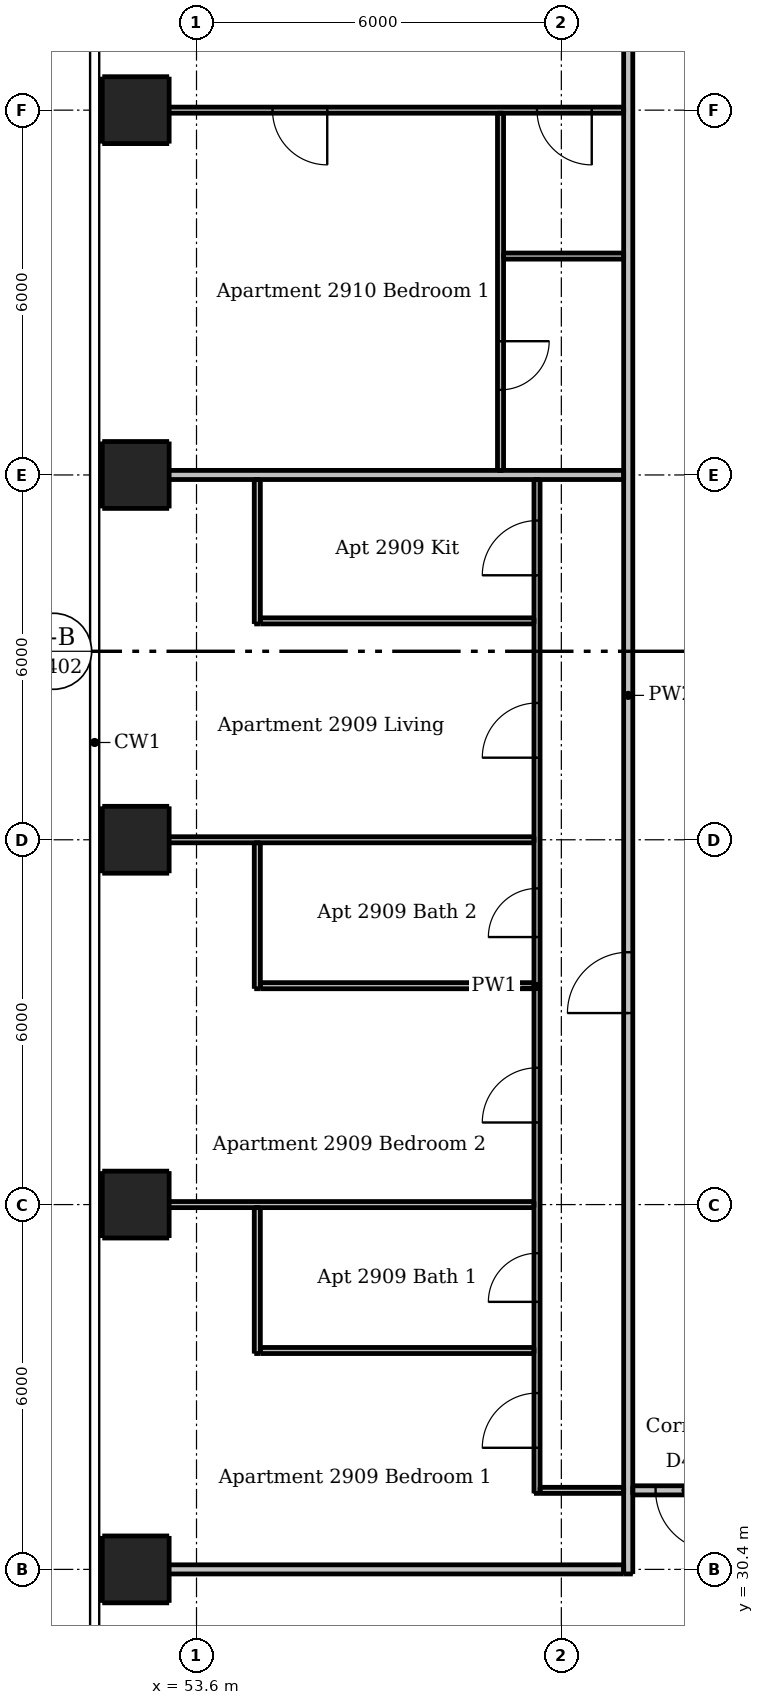
"""IFC4 building model, lengths in metres.
Left out: names, types, materials, properties, quantities, classifications, styles, units other than length and angle.
Written with IfcOpenShell. Run it as: python <this file> out.ifc"""

import sys

from ifc_helpers import new_model, si_unit, direction, frame, frame_2d, origin, origin_2d, place, context, subcontext, project, spatial, rectangle, extrude, element, fill, save


model = new_model("IFC4")
c1 = context("Model", 3, precision=1e-05, world=origin(), true_north=direction((0.0, 1.0)))
c2 = subcontext(c1, "Body", "Model", "MODEL_VIEW")
j1 = project(units=[si_unit("LENGTHUNIT", "METRE"), si_unit("PLANEANGLEUNIT", "RADIAN")], contexts=[c1])
p1 = place(None, origin())
s1 = spatial("IfcSite", under=j1, at=p1, CompositionType="ELEMENT")
p2 = place(p1, origin())
s2 = spatial("IfcBuilding", under=s1, at=p2, CompositionType="ELEMENT")
p3 = place(p2, frame((0.0, 0.0, 108.4)))
s3 = spatial("IfcBuildingStorey", under=s2, at=p3, CompositionType="ELEMENT", Elevation=108.4)
for number, where, z_axis, x_axis in (
    (1, (52.6, 30.4, 0.0), (0.0, 0.0, 1.0), (1.0, 0.0, 0.0)),
    (2, (52.6, 36.4, 0.0), (0.0, 0.0, 1.0), (1.0, 0.0, 0.0)),
    (3, (52.6, 42.4, 0.0), (0.0, 0.0, 1.0), (1.0, 0.0, 0.0)),
    (4, (52.6, 48.4, 0.0), (0.0, 0.0, 1.0), (1.0, 0.0, 0.0)),
    (5, (52.6, 54.4, 0.0), (0.0, 0.0, 1.0), (1.0, 0.0, 0.0)),
):
    element("IfcColumn", number, at=place(p3, frame(where, z_axis=z_axis, x_axis=x_axis)), inside=s3, PredefinedType="COLUMN", context=c2, shape_type="SweptSolid", body=[
        extrude(rectangle(XDim=1.1, YDim=1.1, at=origin_2d()), origin(), (0.0, 0.0, 1.0), 3.05),
    ])
for number, where, z_axis, x_axis in (
    (6, (54.6, 33.95, 0.0), (0.0, 0.0, 1.0), (0.0, 1.0, 0.0)),
    (7, (54.6, 39.95, 0.0), (0.0, 0.0, 1.0), (0.0, 1.0, 0.0)),
):
    element("IfcWall", number, at=place(p3, frame(where, z_axis=z_axis, x_axis=x_axis)), inside=s3, PredefinedType="PARTITIONING", context=c2, shape_type="SweptSolid", body=[
        extrude(rectangle(XDim=2.4, YDim=0.1, at=frame_2d((1.2, 0.0))), origin(), (0.0, 0.0, 1.0), 3.05),
    ])
p4 = place(p3, frame((54.6, 45.95, 0.0), z_axis=(0.0, 0.0, 1.0), x_axis=(0.0, 1.0, 0.0)))
e8 = element("IfcWall", 8, at=p4, inside=s3, PredefinedType="PARTITIONING", context=c2, shape_type="SweptSolid", body=[
    extrude(rectangle(XDim=2.375, YDim=0.1, at=frame_2d((1.188, 0.0))), origin(), (0.0, 0.0, 1.0), 3.05),
])
p5 = place(p3, frame((58.6, 54.35, 0.0), z_axis=(0.0, 0.0, 1.0), x_axis=(0.0, -1.0, 0.0)))
e9 = element("IfcWall", 9, at=p5, inside=s3, PredefinedType="PARTITIONING", context=c2, shape_type="SweptSolid", body=[
    extrude(rectangle(XDim=5.875, YDim=0.1, at=frame_2d((2.938, 0.0))), origin(), (0.0, 0.0, 1.0), 3.05),
])
p6 = place(p5, frame((3.75, 0.0, 0.0)))
e10 = element("IfcOpeningElement", 10, at=p6, cuts=e9, PredefinedType="OPENING", context=c2, shape_type="SweptSolid", body=[
    extrude(rectangle(XDim=0.8, YDim=2.1, at=frame_2d((0.4, 1.05))), frame((0.0, 0.06, 0.0), z_axis=(0.0, -1.0, 0.0), x_axis=(1.0, 0.0, 0.0)), (0.0, 0.0, 1.0), 0.12),
])
p7 = place(p3, frame((59.2, 31.65, 0.0), z_axis=(0.0, 0.0, 1.0), x_axis=(0.0, 1.0, 0.0)))
e11 = element("IfcWall", 11, at=p7, inside=s3, PredefinedType="PARTITIONING", context=c2, shape_type="SweptSolid", body=[
    extrude(rectangle(XDim=16.675, YDim=0.1, at=frame_2d((8.337, 0.0))), origin(), (0.0, 0.0, 1.0), 3.05),
])
p8 = place(p7, frame((12.1, 0.0, 0.0)))
e12 = element("IfcOpeningElement", 12, at=p8, cuts=e11, PredefinedType="OPENING", context=c2, shape_type="SweptSolid", body=[
    extrude(rectangle(XDim=0.9, YDim=2.1, at=frame_2d((0.45, 1.05))), frame((0.0, 0.06, 0.0), z_axis=(0.0, -1.0, 0.0), x_axis=(1.0, 0.0, 0.0)), (0.0, 0.0, 1.0), 0.12),
])
p9 = place(p7, frame((15.1, 0.0, 0.0)))
e13 = element("IfcOpeningElement", 13, at=p9, cuts=e11, PredefinedType="OPENING", context=c2, shape_type="SweptSolid", body=[
    extrude(rectangle(XDim=0.9, YDim=2.1, at=frame_2d((0.45, 1.05))), frame((0.0, 0.06, 0.0), z_axis=(0.0, -1.0, 0.0), x_axis=(1.0, 0.0, 0.0)), (0.0, 0.0, 1.0), 0.12),
])
p10 = place(p7, frame((0.75, 0.0, 0.0)))
e14 = element("IfcOpeningElement", 14, at=p10, cuts=e11, PredefinedType="OPENING", context=c2, shape_type="SweptSolid", body=[
    extrude(rectangle(XDim=0.9, YDim=2.1, at=frame_2d((0.45, 1.05))), frame((0.0, 0.06, 0.0), z_axis=(0.0, -1.0, 0.0), x_axis=(1.0, 0.0, 0.0)), (0.0, 0.0, 1.0), 0.12),
])
p11 = place(p7, frame((6.1, 0.0, 0.0)))
e15 = element("IfcOpeningElement", 15, at=p11, cuts=e11, PredefinedType="OPENING", context=c2, shape_type="SweptSolid", body=[
    extrude(rectangle(XDim=0.9, YDim=2.1, at=frame_2d((0.45, 1.05))), frame((0.0, 0.06, 0.0), z_axis=(0.0, -1.0, 0.0), x_axis=(1.0, 0.0, 0.0)), (0.0, 0.0, 1.0), 0.12),
])
p12 = place(p7, frame((3.15, 0.0, 0.0)))
e16 = element("IfcOpeningElement", 16, at=p12, cuts=e11, PredefinedType="OPENING", context=c2, shape_type="SweptSolid", body=[
    extrude(rectangle(XDim=0.8, YDim=2.1, at=frame_2d((0.4, 1.05))), frame((0.0, 0.06, 0.0), z_axis=(0.0, -1.0, 0.0), x_axis=(1.0, 0.0, 0.0)), (0.0, 0.0, 1.0), 0.12),
])
p13 = place(p7, frame((9.15, 0.0, 0.0)))
e17 = element("IfcOpeningElement", 17, at=p13, cuts=e11, PredefinedType="OPENING", context=c2, shape_type="SweptSolid", body=[
    extrude(rectangle(XDim=0.8, YDim=2.1, at=frame_2d((0.4, 1.05))), frame((0.0, 0.06, 0.0), z_axis=(0.0, -1.0, 0.0), x_axis=(1.0, 0.0, 0.0)), (0.0, 0.0, 1.0), 0.12),
])
p14 = place(p3, frame((60.625, 54.4, 0.0), z_axis=(0.0, 0.0, 1.0), x_axis=(-1.0, 0.0, 0.0)))
e18 = element("IfcWall", 18, at=p14, inside=s3, PredefinedType="PARTITIONING", context=c2, shape_type="SweptSolid", body=[
    extrude(rectangle(XDim=8.625, YDim=0.1, at=frame_2d((4.312, 0.0))), origin(), (0.0, 0.0, 1.0), 2.516),
])
p15 = place(p14, frame((0.525, 0.0, 0.0)))
e19 = element("IfcOpeningElement", 19, at=p15, cuts=e18, PredefinedType="OPENING", context=c2, shape_type="SweptSolid", body=[
    extrude(rectangle(XDim=0.9, YDim=2.1, at=frame_2d((0.45, 1.05))), frame((0.0, 0.06, 0.0), z_axis=(0.0, -1.0, 0.0), x_axis=(1.0, 0.0, 0.0)), (0.0, 0.0, 1.0), 0.12),
])
p16 = place(p14, frame((4.875, 0.0, 0.0)))
e20 = element("IfcOpeningElement", 20, at=p16, cuts=e18, PredefinedType="OPENING", context=c2, shape_type="SweptSolid", body=[
    extrude(rectangle(XDim=0.9, YDim=2.1, at=frame_2d((0.45, 1.05))), frame((0.0, 0.06, 0.0), z_axis=(0.0, -1.0, 0.0), x_axis=(1.0, 0.0, 0.0)), (0.0, 0.0, 1.0), 0.12),
])
p17 = place(p3, frame((58.65, 52.0, 0.0), z_axis=(0.0, 0.0, 1.0), x_axis=(1.0, 0.0, 0.0)))
e21 = element("IfcWall", 21, at=p17, inside=s3, PredefinedType="PARTITIONING", context=c2, shape_type="SweptSolid", body=[
    extrude(rectangle(XDim=1.975, YDim=0.1, at=frame_2d((0.988, 0.0))), origin(), (0.0, 0.0, 1.0), 3.05),
])
p18 = place(p3, frame((54.65, 46.0, 0.0), z_axis=(0.0, 0.0, 1.0), x_axis=(1.0, 0.0, 0.0)))
e22 = element("IfcWall", 22, at=p18, inside=s3, PredefinedType="PARTITIONING", context=c2, shape_type="SweptSolid", body=[
    extrude(rectangle(XDim=4.5, YDim=0.1, at=frame_2d((2.25, 0.0))), origin(), (0.0, 0.0, 1.0), 3.05),
])
p19 = place(p3, frame((52.0, 42.4, 0.0), z_axis=(0.0, 0.0, 1.0), x_axis=(1.0, 0.0, 0.0)))
e23 = element("IfcWall", 23, at=p19, inside=s3, PredefinedType="PARTITIONING", context=c2, shape_type="SweptSolid", body=[
    extrude(rectangle(XDim=7.15, YDim=0.1, at=frame_2d((3.575, 0.0))), origin(), (0.0, 0.0, 1.0), 2.516),
])
p20 = place(p3, frame((54.65, 40.0, 0.0), z_axis=(0.0, 0.0, 1.0), x_axis=(1.0, 0.0, 0.0)))
e24 = element("IfcWall", 24, at=p20, inside=s3, PredefinedType="PARTITIONING", context=c2, shape_type="SweptSolid", body=[
    extrude(rectangle(XDim=4.5, YDim=0.1, at=frame_2d((2.25, 0.0))), origin(), (0.0, 0.0, 1.0), 3.05),
])
p21 = place(p3, frame((52.0, 36.4, 0.0), z_axis=(0.0, 0.0, 1.0), x_axis=(1.0, 0.0, 0.0)))
e25 = element("IfcWall", 25, at=p21, inside=s3, PredefinedType="PARTITIONING", context=c2, shape_type="SweptSolid", body=[
    extrude(rectangle(XDim=7.15, YDim=0.1, at=frame_2d((3.575, 0.0))), origin(), (0.0, 0.0, 1.0), 2.516),
])
p22 = place(p3, frame((54.65, 34.0, 0.0), z_axis=(0.0, 0.0, 1.0), x_axis=(1.0, 0.0, 0.0)))
e26 = element("IfcWall", 26, at=p22, inside=s3, PredefinedType="PARTITIONING", context=c2, shape_type="SweptSolid", body=[
    extrude(rectangle(XDim=4.5, YDim=0.1, at=frame_2d((2.25, 0.0))), origin(), (0.0, 0.0, 1.0), 3.05),
])
p23 = place(p3, frame((59.25, 31.7, 0.0), z_axis=(0.0, 0.0, 1.0), x_axis=(1.0, 0.0, 0.0)))
e27 = element("IfcWall", 27, at=p23, inside=s3, PredefinedType="PARTITIONING", context=c2, shape_type="SweptSolid", body=[
    extrude(rectangle(XDim=1.375, YDim=0.1, at=frame_2d((0.688, 0.0))), origin(), (0.0, 0.0, 1.0), 3.05),
])
p24 = place(p3, frame((60.7, 30.325, 0.0), z_axis=(0.0, 0.0, 1.0), x_axis=(0.0, 1.0, 0.0)))
e28 = element("IfcWall", 28, at=p24, inside=s3, PredefinedType="PARTITIONING", context=c2, shape_type="SweptSolid", body=[
    extrude(rectangle(XDim=28.9, YDim=0.15, at=frame_2d((14.45, 0.0))), origin(), (0.0, 0.0, 1.0), 3.05),
])
p25 = place(p24, frame((9.225, 0.0, 0.0)))
e29 = element("IfcOpeningElement", 29, at=p25, cuts=e28, PredefinedType="OPENING", context=c2, shape_type="SweptSolid", body=[
    extrude(rectangle(XDim=1.0, YDim=2.1, at=frame_2d((0.5, 1.05))), frame((0.0, 0.085, 0.0), z_axis=(0.0, -1.0, 0.0), x_axis=(1.0, 0.0, 0.0)), (0.0, 0.0, 1.0), 0.17),
])
p26 = place(p24, frame((26.025, 0.0, 0.0)))
e30 = element("IfcOpeningElement", 30, at=p26, cuts=e28, PredefinedType="OPENING", context=c2, shape_type="SweptSolid", body=[
    extrude(rectangle(XDim=1.0, YDim=2.1, at=frame_2d((0.5, 1.05))), frame((0.0, 0.085, 0.0), z_axis=(0.0, -1.0, 0.0), x_axis=(1.0, 0.0, 0.0)), (0.0, 0.0, 1.0), 0.17),
])
p27 = place(p3, frame((52.0, 48.4, 0.0), z_axis=(0.0, 0.0, 1.0), x_axis=(1.0, 0.0, 0.0)))
e31 = element("IfcWall", 31, at=p27, inside=s3, PredefinedType="PARTITIONING", context=c2, shape_type="SweptSolid", body=[
    extrude(rectangle(XDim=8.625, YDim=0.15, at=frame_2d((4.312, 0.0))), origin(), (0.0, 0.0, 1.0), 2.516),
])
p28 = place(p3, frame((89.525, 31.7, 0.0), z_axis=(0.0, 0.0, 1.0), x_axis=(-1.0, 0.0, 0.0)))
e32 = element("IfcWall", 32, at=p28, inside=s3, PredefinedType="PARTITIONING", context=c2, shape_type="SweptSolid", body=[
    extrude(rectangle(XDim=28.75, YDim=0.15, at=frame_2d((14.375, 0.0))), origin(), (0.0, 0.0, 1.0), 3.05),
])
p29 = place(p28, frame((27.375, 0.0, 0.0)))
e33 = element("IfcOpeningElement", 33, at=p29, cuts=e32, PredefinedType="OPENING", context=c2, shape_type="SweptSolid", body=[
    extrude(rectangle(XDim=1.0, YDim=2.1, at=frame_2d((0.5, 1.05))), frame((0.0, 0.085, 0.0), z_axis=(0.0, -1.0, 0.0), x_axis=(1.0, 0.0, 0.0)), (0.0, 0.0, 1.0), 0.17),
])
p30 = place(p28, frame((12.625, 0.0, 0.0)))
e34 = element("IfcOpeningElement", 34, at=p30, cuts=e32, PredefinedType="OPENING", context=c2, shape_type="SweptSolid", body=[
    extrude(rectangle(XDim=1.0, YDim=2.1, at=frame_2d((0.5, 1.05))), frame((0.0, 0.085, 0.0), z_axis=(0.0, -1.0, 0.0), x_axis=(1.0, 0.0, 0.0)), (0.0, 0.0, 1.0), 0.17),
])
p31 = place(p28, frame((2.425, 0.0, 0.0)))
e35 = element("IfcOpeningElement", 35, at=p31, cuts=e32, PredefinedType="OPENING", context=c2, shape_type="SweptSolid", body=[
    extrude(rectangle(XDim=1.0, YDim=2.1, at=frame_2d((0.5, 1.05))), frame((0.0, 0.085, 0.0), z_axis=(0.0, -1.0, 0.0), x_axis=(1.0, 0.0, 0.0)), (0.0, 0.0, 1.0), 0.17),
])
p32 = place(p3, frame((52.0, 30.4, 0.0), z_axis=(0.0, 0.0, 1.0), x_axis=(1.0, 0.0, 0.0)))
e36 = element("IfcWall", 36, at=p32, inside=s3, PredefinedType="PARTITIONING", context=c2, shape_type="SweptSolid", body=[
    extrude(rectangle(XDim=8.625, YDim=0.15, at=frame_2d((4.312, 0.0))), origin(), (0.0, 0.0, 1.0), 2.647),
])
p33 = place(p29, origin())
e37 = element("IfcDoor", 37, at=p33, inside=s3, OperationType="SINGLE_SWING_LEFT", PredefinedType="DOOR", context=c2, shape_type="SweptSolid", body=[
    extrude(rectangle(XDim=1.0, YDim=2.1, at=frame_2d((0.5, 1.05))), frame((0.0, 0.025, 0.0), z_axis=(0.0, -1.0, 0.0), x_axis=(1.0, 0.0, 0.0)), (0.0, 0.0, 1.0), 0.05),
])
fill(e33, e37)
p34 = place(p25, origin())
e38 = element("IfcDoor", 38, at=p34, inside=s3, OperationType="SINGLE_SWING_LEFT", PredefinedType="DOOR", context=c2, shape_type="SweptSolid", body=[
    extrude(rectangle(XDim=1.0, YDim=2.1, at=frame_2d((0.5, 1.05))), frame((0.0, 0.025, 0.0), z_axis=(0.0, -1.0, 0.0), x_axis=(1.0, 0.0, 0.0)), (0.0, 0.0, 1.0), 0.05),
])
fill(e29, e38)
p35 = place(p8, origin())
e39 = element("IfcDoor", 39, at=p35, inside=s3, OperationType="SINGLE_SWING_LEFT", PredefinedType="DOOR", context=c2, shape_type="SweptSolid", body=[
    extrude(rectangle(XDim=0.9, YDim=2.1, at=frame_2d((0.45, 1.05))), frame((0.0, 0.025, 0.0), z_axis=(0.0, -1.0, 0.0), x_axis=(1.0, 0.0, 0.0)), (0.0, 0.0, 1.0), 0.05),
])
fill(e12, e39)
p36 = place(p9, origin())
e40 = element("IfcDoor", 40, at=p36, inside=s3, OperationType="SINGLE_SWING_LEFT", PredefinedType="DOOR", context=c2, shape_type="SweptSolid", body=[
    extrude(rectangle(XDim=0.9, YDim=2.1, at=frame_2d((0.45, 1.05))), frame((0.0, 0.025, 0.0), z_axis=(0.0, -1.0, 0.0), x_axis=(1.0, 0.0, 0.0)), (0.0, 0.0, 1.0), 0.05),
])
fill(e13, e40)
p37 = place(p10, origin())
e41 = element("IfcDoor", 41, at=p37, inside=s3, OperationType="SINGLE_SWING_LEFT", PredefinedType="DOOR", context=c2, shape_type="SweptSolid", body=[
    extrude(rectangle(XDim=0.9, YDim=2.1, at=frame_2d((0.45, 1.05))), frame((0.0, 0.025, 0.0), z_axis=(0.0, -1.0, 0.0), x_axis=(1.0, 0.0, 0.0)), (0.0, 0.0, 1.0), 0.05),
])
fill(e14, e41)
p38 = place(p11, origin())
e42 = element("IfcDoor", 42, at=p38, inside=s3, OperationType="SINGLE_SWING_LEFT", PredefinedType="DOOR", context=c2, shape_type="SweptSolid", body=[
    extrude(rectangle(XDim=0.9, YDim=2.1, at=frame_2d((0.45, 1.05))), frame((0.0, 0.025, 0.0), z_axis=(0.0, -1.0, 0.0), x_axis=(1.0, 0.0, 0.0)), (0.0, 0.0, 1.0), 0.05),
])
fill(e15, e42)
p39 = place(p12, origin())
e43 = element("IfcDoor", 43, at=p39, inside=s3, OperationType="SINGLE_SWING_LEFT", PredefinedType="DOOR", context=c2, shape_type="SweptSolid", body=[
    extrude(rectangle(XDim=0.8, YDim=2.1, at=frame_2d((0.4, 1.05))), frame((0.0, 0.025, 0.0), z_axis=(0.0, -1.0, 0.0), x_axis=(1.0, 0.0, 0.0)), (0.0, 0.0, 1.0), 0.05),
])
fill(e16, e43)
p40 = place(p13, origin())
e44 = element("IfcDoor", 44, at=p40, inside=s3, OperationType="SINGLE_SWING_LEFT", PredefinedType="DOOR", context=c2, shape_type="SweptSolid", body=[
    extrude(rectangle(XDim=0.8, YDim=2.1, at=frame_2d((0.4, 1.05))), frame((0.0, 0.025, 0.0), z_axis=(0.0, -1.0, 0.0), x_axis=(1.0, 0.0, 0.0)), (0.0, 0.0, 1.0), 0.05),
])
fill(e17, e44)
p41 = place(p15, origin())
e45 = element("IfcDoor", 45, at=p41, inside=s3, OperationType="SINGLE_SWING_LEFT", PredefinedType="DOOR", context=c2, shape_type="SweptSolid", body=[
    extrude(rectangle(XDim=0.9, YDim=2.1, at=frame_2d((0.45, 1.05))), frame((0.0, 0.025, 0.0), z_axis=(0.0, -1.0, 0.0), x_axis=(1.0, 0.0, 0.0)), (0.0, 0.0, 1.0), 0.05),
])
fill(e19, e45)
p42 = place(p16, origin())
e46 = element("IfcDoor", 46, at=p42, inside=s3, OperationType="SINGLE_SWING_LEFT", PredefinedType="DOOR", context=c2, shape_type="SweptSolid", body=[
    extrude(rectangle(XDim=0.9, YDim=2.1, at=frame_2d((0.45, 1.05))), frame((0.0, 0.025, 0.0), z_axis=(0.0, -1.0, 0.0), x_axis=(1.0, 0.0, 0.0)), (0.0, 0.0, 1.0), 0.05),
])
fill(e20, e46)
p43 = place(p6, origin())
e47 = element("IfcDoor", 47, at=p43, inside=s3, OperationType="SINGLE_SWING_LEFT", PredefinedType="DOOR", context=c2, shape_type="SweptSolid", body=[
    extrude(rectangle(XDim=0.8, YDim=2.1, at=frame_2d((0.4, 1.05))), frame((0.0, 0.025, 0.0), z_axis=(0.0, -1.0, 0.0), x_axis=(1.0, 0.0, 0.0)), (0.0, 0.0, 1.0), 0.05),
])
fill(e10, e47)
save(model, sys.argv[1])
